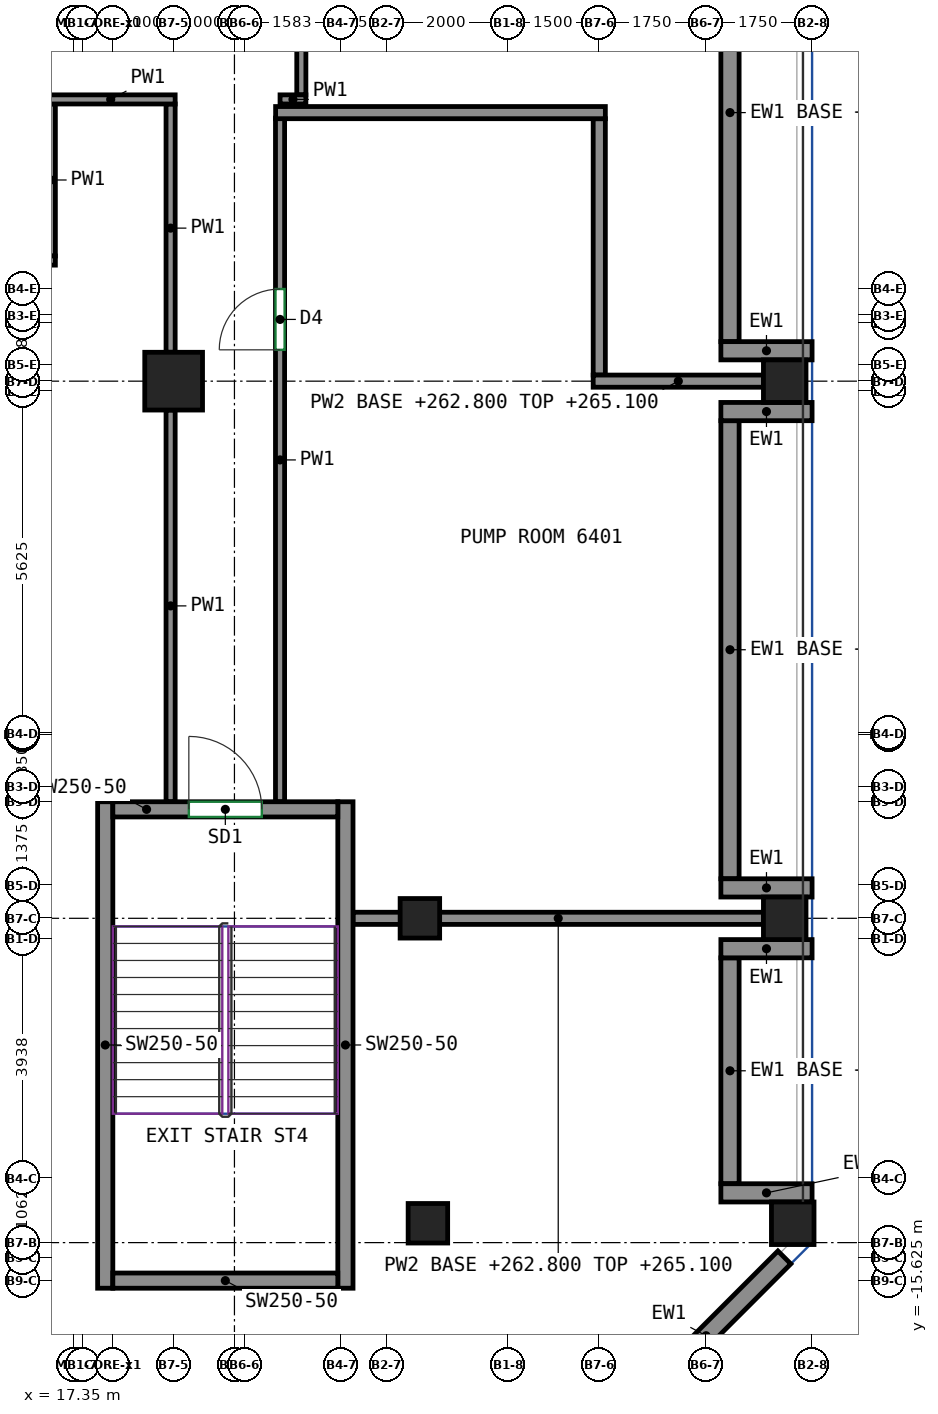
"""IFC4 building model, lengths in metres.
Left out: names, types, materials, properties, quantities, classifications, styles, units other than length and angle.
Written with IfcOpenShell. Run it as: python <this file> out.ifc"""

import sys

from ifc_helpers import new_model, si_unit, direction, frame, frame_2d, origin, origin_2d, place, context, subcontext, project, spatial, rectangle, extrude, source, transform, mapped, element, fill, save


model = new_model("IFC4")
c1 = context("Model", 3, precision=1e-05, world=origin(), true_north=direction((0.0, 1.0)))
c2 = subcontext(c1, "Body", "Model", "MODEL_VIEW")
j1 = project(units=[si_unit("LENGTHUNIT", "METRE"), si_unit("PLANEANGLEUNIT", "RADIAN")], contexts=[c1])
p1 = place(None, origin())
s1 = spatial("IfcSite", under=j1, at=p1, CompositionType="ELEMENT")
p2 = place(p1, origin())
s2 = spatial("IfcBuilding", under=s1, at=p2, CompositionType="ELEMENT")
p3 = place(p2, frame((0.0, 0.0, 262.8)))
s3 = spatial("IfcBuildingStorey", under=s2, at=p3, CompositionType="ELEMENT", Elevation=262.8)
m1 = source(origin(), c2, "Body", "SweptSolid", [
    extrude(rectangle(XDim=0.95, YDim=0.95, at=origin_2d()), origin(), (0.0, 0.0, 1.0), 2.3),
])
p4 = place(p3, frame((19.0, -0.833, 0.0), z_axis=(0.0, 0.0, 1.0), x_axis=(1.0, 0.0, 0.0)))
e1 = element("IfcColumn", 1, at=p4, inside=s3, PredefinedType="COLUMN", context=c2, shape_type="MappedRepresentation", body=[
    mapped(m1, transform((0.0, 0.0, 0.0))),
])
m2 = source(origin(), c2, "Body", "SweptSolid", [
    extrude(rectangle(XDim=0.7, YDim=0.7, at=origin_2d()), origin(), (0.0, 0.0, 1.0), 2.3),
])
for number, where, z_axis, x_axis in (
    (2, (29.05, -9.667, 0.0), (0.0, 0.0, 1.0), (1.0, 0.0, 0.0)),
    (3, (29.05, -0.833, 0.0), (0.0, 0.0, 1.0), (1.0, 0.0, 0.0)),
    (4, (29.182, -14.682, 0.0), (0.0, 0.0, 1.0), (1.0, 0.0, 0.0)),
):
    element("IfcColumn", number, at=place(p3, frame(where, z_axis=z_axis, x_axis=x_axis)), inside=s3, PredefinedType="COLUMN", context=c2, shape_type="MappedRepresentation", body=[
        mapped(m2, transform((0.0, 0.0, 0.0))),
    ])
m3 = source(origin(), c2, "Body", "SweptSolid", [
    extrude(rectangle(XDim=0.65, YDim=0.65, at=origin_2d()), origin(), (0.0, 0.0, 1.0), 3.8),
])
for number, where, z_axis, x_axis in (
    (5, (23.182, -14.682, 0.0), (0.0, 0.0, 1.0), (1.0, 0.0, 0.0)),
    (6, (23.05, -9.667, 0.0), (0.0, 0.0, 1.0), (1.0, 0.0, 0.0)),
):
    element("IfcColumn", number, at=place(p3, frame(where, z_axis=z_axis, x_axis=x_axis)), inside=s3, PredefinedType="COLUMN", context=c2, shape_type="MappedRepresentation", body=[
        mapped(m3, transform((0.0, 0.0, 0.0))),
    ])
m4 = source(origin(), c2, "Body", "SweptSolid", [
    extrude(rectangle(XDim=8.0, YDim=0.25, at=frame_2d((4.0, 0.0))), origin(), (0.0, 0.0, 1.0), 3.8),
])
for number, where, z_axis, x_axis in (
    (7, (17.875, -15.75, 0.0), (0.0, 0.0, 1.0), (0.0, 1.0, 0.0)),
    (8, (21.825, -15.75, 0.0), (0.0, 0.0, 1.0), (0.0, 1.0, 0.0)),
):
    element("IfcWall", number, at=place(p3, frame(where, z_axis=z_axis, x_axis=x_axis)), inside=s3, PredefinedType="SHEAR", context=c2, shape_type="MappedRepresentation", body=[
        mapped(m4, transform((0.0, 0.0, 0.0))),
    ])
m5 = source(origin(), c2, "Body", "SweptSolid", [
    extrude(rectangle(XDim=3.7, YDim=0.25, at=frame_2d((1.85, 0.0))), origin(), (0.0, 0.0, 1.0), 3.8),
])
p5 = place(p3, frame((18.0, -15.625, 0.0), z_axis=(0.0, 0.0, 1.0), x_axis=(1.0, 0.0, 0.0)))
e9 = element("IfcWall", 9, at=p5, inside=s3, PredefinedType="SHEAR", context=c2, shape_type="MappedRepresentation", body=[
    mapped(m5, transform((0.0, 0.0, 0.0))),
])
p6 = place(p3, frame((18.0, -7.875, 0.0), z_axis=(0.0, 0.0, 1.0), x_axis=(1.0, 0.0, 0.0)))
e10 = element("IfcWall", 10, at=p6, inside=s3, PredefinedType="SHEAR", context=c2, shape_type="MappedRepresentation", body=[
    mapped(m5, transform((0.0, 0.0, 0.0))),
])
p7 = place(p6, frame((1.25, 0.0, 0.0)))
e11 = element("IfcOpeningElement", 11, at=p7, cuts=e10, PredefinedType="OPENING", context=c2, shape_type="SweptSolid", body=[
    extrude(rectangle(XDim=1.2, YDim=2.1, at=frame_2d((0.6, 1.05))), frame((0.0, 0.135, 0.0), z_axis=(0.0, -1.0, 0.0), x_axis=(1.0, 0.0, 0.0)), (0.0, 0.0, 1.0), 0.27),
])
m6 = source(origin(), c2, "Body", "SweptSolid", [
    extrude(rectangle(XDim=3.642, YDim=0.3, at=frame_2d((1.821, 0.0))), origin(), (0.0, 0.0, 1.0), 2.3),
])
p8 = place(p3, frame((26.469, -17.819, 0.0), z_axis=(0.0, 0.0, 1.0), x_axis=(0.707106781187, 0.707106781187, 0.0)))
e12 = element("IfcWall", 12, at=p8, inside=s3, PredefinedType="SOLIDWALL", context=c2, shape_type="MappedRepresentation", body=[
    mapped(m6, transform((0.0, 0.0, 0.0))),
])
m7 = source(origin(), c2, "Body", "SweptSolid", [
    extrude(rectangle(XDim=3.715, YDim=0.3, at=frame_2d((1.857, 0.0))), origin(), (0.0, 0.0, 1.0), 1.1),
])
p9 = place(p3, frame((28.15, -14.032, 0.0), z_axis=(0.0, 0.0, 1.0), x_axis=(0.0, 1.0, 0.0)))
e13 = element("IfcWall", 13, at=p9, inside=s3, PredefinedType="SOLIDWALL", context=c2, shape_type="MappedRepresentation", body=[
    mapped(m7, transform((0.0, 0.0, 0.0))),
])
m8 = source(origin(), c2, "Body", "SweptSolid", [
    extrude(rectangle(XDim=1.5, YDim=0.3, at=frame_2d((0.75, 0.0))), origin(), (0.0, 0.0, 1.0), 3.8),
])
p10 = place(p3, frame((29.5, -14.182, 0.0), z_axis=(0.0, 0.0, 1.0), x_axis=(-1.0, 0.0, 0.0)))
e14 = element("IfcWall", 14, at=p10, inside=s3, PredefinedType="SOLIDWALL", context=c2, shape_type="MappedRepresentation", body=[
    mapped(m8, transform((0.0, 0.0, 0.0))),
])
m9 = source(origin(), c2, "Body", "SweptSolid", [
    extrude(rectangle(XDim=1.5, YDim=0.3, at=frame_2d((0.75, 0.0))), origin(), (0.0, 0.0, 1.0), 2.3),
])
p11 = place(p3, frame((29.5, -10.167, 0.0), z_axis=(0.0, 0.0, 1.0), x_axis=(-1.0, 0.0, 0.0)))
e15 = element("IfcWall", 15, at=p11, inside=s3, PredefinedType="SOLIDWALL", context=c2, shape_type="MappedRepresentation", body=[
    mapped(m9, transform((0.0, 0.0, 0.0))),
])
m10 = source(origin(), c2, "Body", "SweptSolid", [
    extrude(rectangle(XDim=7.533, YDim=0.3, at=frame_2d((3.767, 0.0))), origin(), (0.0, 0.0, 1.0), 1.1),
])
p12 = place(p3, frame((28.15, -9.017, 0.0), z_axis=(0.0, 0.0, 1.0), x_axis=(0.0, 1.0, 0.0)))
e16 = element("IfcWall", 16, at=p12, inside=s3, PredefinedType="SOLIDWALL", context=c2, shape_type="MappedRepresentation", body=[
    mapped(m10, transform((0.0, 0.0, 0.0))),
])
for number, where, z_axis, x_axis in (
    (17, (29.5, -9.167, 0.0), (0.0, 0.0, 1.0), (-1.0, 0.0, 0.0)),
    (18, (29.5, -1.333, 0.0), (0.0, 0.0, 1.0), (-1.0, 0.0, 0.0)),
):
    element("IfcWall", number, at=place(p3, frame(where, z_axis=z_axis, x_axis=x_axis)), inside=s3, PredefinedType="SOLIDWALL", context=c2, shape_type="MappedRepresentation", body=[
        mapped(m9, transform((0.0, 0.0, 0.0))),
    ])
m11 = source(origin(), c2, "Body", "SweptSolid", [
    extrude(rectangle(XDim=7.533, YDim=0.3, at=frame_2d((3.767, 0.0))), origin(), (0.0, 0.0, 1.0), 1.1),
])
p13 = place(p3, frame((28.15, -0.183, 0.0), z_axis=(0.0, 0.0, 1.0), x_axis=(0.0, 1.0, 0.0)))
e19 = element("IfcWall", 19, at=p13, inside=s3, PredefinedType="SOLIDWALL", context=c2, shape_type="MappedRepresentation", body=[
    mapped(m11, transform((0.0, 0.0, 0.0))),
])
p14 = place(p3, frame((29.5, -0.333, 0.0), z_axis=(0.0, 0.0, 1.0), x_axis=(-1.0, 0.0, 0.0)))
e20 = element("IfcWall", 20, at=p14, inside=s3, PredefinedType="SOLIDWALL", context=c2, shape_type="MappedRepresentation", body=[
    mapped(m9, transform((0.0, 0.0, 0.0))),
])
p15 = place(p3, frame((16.98, 1.225, 0.0), z_axis=(0.0, 0.0, 1.0), x_axis=(0.0, 1.0, 0.0)))
e21 = element("IfcWall", 21, at=p15, inside=s3, PredefinedType="PARTITIONING", context=c2, shape_type="SweptSolid", body=[
    extrude(rectangle(XDim=2.5, YDim=0.15, at=frame_2d((1.25, 0.0))), origin(), (0.0, 0.0, 1.0), 3.8),
])
p16 = place(p3, frame((8.405, 1.15, 0.0), z_axis=(0.0, 0.0, 1.0), x_axis=(1.0, 0.0, 0.0)))
e22 = element("IfcWall", 22, at=p16, inside=s3, PredefinedType="PARTITIONING", context=c2, shape_type="SweptSolid", body=[
    extrude(rectangle(XDim=8.65, YDim=0.15, at=frame_2d((4.325, 0.0))), origin(), (0.0, 0.0, 1.0), 3.8),
])
p17 = place(p16, frame((4.127, 0.0, 0.0)))
e23 = element("IfcOpeningElement", 23, at=p17, cuts=e22, PredefinedType="OPENING", context=c2, shape_type="SweptSolid", body=[
    extrude(rectangle(XDim=1.0, YDim=2.1, at=frame_2d((0.5, 1.05))), frame((0.0, 0.085, 0.0), z_axis=(0.0, -1.0, 0.0), x_axis=(1.0, 0.0, 0.0)), (0.0, 0.0, 1.0), 0.17),
])
p18 = place(p3, frame((18.95, -7.75, 0.0), z_axis=(0.0, 0.0, 1.0), x_axis=(0.0, 1.0, 0.0)))
e24 = element("IfcWall", 24, at=p18, inside=s3, PredefinedType="PARTITIONING", context=c2, shape_type="SweptSolid", body=[
    extrude(rectangle(XDim=6.442, YDim=0.15, at=frame_2d((3.221, 0.0))), origin(), (0.0, 0.0, 1.0), 3.8),
])
p19 = place(p3, frame((18.95, -0.358, 0.0), z_axis=(0.0, 0.0, 1.0), x_axis=(0.0, 1.0, 0.0)))
e25 = element("IfcWall", 25, at=p19, inside=s3, PredefinedType="PARTITIONING", context=c2, shape_type="SweptSolid", body=[
    extrude(rectangle(XDim=4.083, YDim=0.15, at=frame_2d((2.042, 0.0))), origin(), (0.0, 0.0, 1.0), 3.8),
])
p20 = place(p3, frame((16.905, 3.8, 0.0), z_axis=(0.0, 0.0, 1.0), x_axis=(1.0, 0.0, 0.0)))
e26 = element("IfcWall", 26, at=p20, inside=s3, PredefinedType="PARTITIONING", context=c2, shape_type="SweptSolid", body=[
    extrude(rectangle(XDim=2.12, YDim=0.15, at=frame_2d((1.06, 0.0))), origin(), (0.0, 0.0, 1.0), 3.8),
])
p21 = place(p3, frame((20.75, -7.75, 0.0), z_axis=(0.0, 0.0, 1.0), x_axis=(0.0, 1.0, 0.0)))
e27 = element("IfcWall", 27, at=p21, inside=s3, PredefinedType="PARTITIONING", context=c2, shape_type="SweptSolid", body=[
    extrude(rectangle(XDim=11.243, YDim=0.15, at=frame_2d((5.622, 0.0))), origin(), (0.0, 0.0, 1.0), 3.8),
])
p22 = place(p21, frame((7.432, 0.0, 0.0)))
e28 = element("IfcOpeningElement", 28, at=p22, cuts=e27, PredefinedType="OPENING", context=c2, shape_type="SweptSolid", body=[
    extrude(rectangle(XDim=1.0, YDim=2.1, at=frame_2d((0.5, 1.05))), frame((0.0, 0.085, 0.0), z_axis=(0.0, -1.0, 0.0), x_axis=(1.0, 0.0, 0.0)), (0.0, 0.0, 1.0), 0.17),
])
p23 = place(p3, frame((21.1, 3.875, 0.0), z_axis=(0.0, 0.0, 1.0), x_axis=(0.0, 1.0, 0.0)))
e29 = element("IfcWall", 29, at=p23, inside=s3, PredefinedType="PARTITIONING", context=c2, shape_type="SweptSolid", body=[
    extrude(rectangle(XDim=18.035, YDim=0.15, at=frame_2d((9.018, 0.0))), origin(), (0.0, 0.0, 1.0), 3.8),
])
p24 = place(p23, frame((7.014, 0.0, 0.0)))
e30 = element("IfcOpeningElement", 30, at=p24, cuts=e29, PredefinedType="OPENING", context=c2, shape_type="SweptSolid", body=[
    extrude(rectangle(XDim=1.0, YDim=2.1, at=frame_2d((0.5, 1.05))), frame((0.0, 0.085, 0.0), z_axis=(0.0, -1.0, 0.0), x_axis=(1.0, 0.0, 0.0)), (0.0, 0.0, 1.0), 0.17),
])
p25 = place(p3, frame((20.75, 3.8, 0.0), z_axis=(0.0, 0.0, 1.0), x_axis=(1.0, 0.0, 0.0)))
e31 = element("IfcWall", 31, at=p25, inside=s3, PredefinedType="PARTITIONING", context=c2, shape_type="SweptSolid", body=[
    extrude(rectangle(XDim=0.425, YDim=0.15, at=frame_2d((0.212, 0.0))), origin(), (0.0, 0.0, 1.0), 3.8),
])
p26 = place(p3, frame((21.95, -9.667, 0.0), z_axis=(0.0, 0.0, 1.0), x_axis=(1.0, 0.0, 0.0)))
e32 = element("IfcWall", 32, at=p26, inside=s3, PredefinedType="PARTITIONING", context=c2, shape_type="SweptSolid", body=[
    extrude(rectangle(XDim=6.75, YDim=0.2, at=frame_2d((3.375, 0.0))), origin(), (0.0, 0.0, 1.0), 2.3),
])
p27 = place(p3, frame((26.0, -0.733, 0.0), z_axis=(0.0, 0.0, 1.0), x_axis=(0.0, 1.0, 0.0)))
e33 = element("IfcWall", 33, at=p27, inside=s3, PredefinedType="PARTITIONING", context=c2, shape_type="SweptSolid", body=[
    extrude(rectangle(XDim=4.216, YDim=0.2, at=frame_2d((2.108, 0.0))), origin(), (0.0, 0.0, 1.0), 3.8),
])
p28 = place(p3, frame((28.7, -0.833, 0.0), z_axis=(0.0, 0.0, 1.0), x_axis=(-1.0, 0.0, 0.0)))
e34 = element("IfcWall", 34, at=p28, inside=s3, PredefinedType="PARTITIONING", context=c2, shape_type="SweptSolid", body=[
    extrude(rectangle(XDim=2.8, YDim=0.2, at=frame_2d((1.4, 0.0))), origin(), (0.0, 0.0, 1.0), 2.3),
])
p29 = place(p3, frame((26.1, 3.583, 0.0), z_axis=(0.0, 0.0, 1.0), x_axis=(-1.0, 0.0, 0.0)))
e35 = element("IfcWall", 35, at=p29, inside=s3, PredefinedType="PARTITIONING", context=c2, shape_type="SweptSolid", body=[
    extrude(rectangle(XDim=5.423, YDim=0.2, at=frame_2d((2.711, 0.0))), origin(), (0.0, 0.0, 1.0), 3.8),
])
p30 = place(p7, origin())
e36 = element("IfcDoor", 36, at=p30, inside=s3, OperationType="DOUBLE_DOOR_SINGLE_SWING", PredefinedType="DOOR", context=c2, shape_type="SweptSolid", body=[
    extrude(rectangle(XDim=1.2, YDim=2.1, at=frame_2d((0.6, 1.05))), frame((0.0, 0.025, 0.0), z_axis=(0.0, -1.0, 0.0), x_axis=(1.0, 0.0, 0.0)), (0.0, 0.0, 1.0), 0.05),
])
fill(e11, e36)
p31 = place(p22, origin())
e37 = element("IfcDoor", 37, at=p31, inside=s3, OperationType="SINGLE_SWING_LEFT", PredefinedType="DOOR", context=c2, shape_type="SweptSolid", body=[
    extrude(rectangle(XDim=1.0, YDim=2.1, at=frame_2d((0.5, 1.05))), frame((0.0, 0.025, 0.0), z_axis=(0.0, -1.0, 0.0), x_axis=(1.0, 0.0, 0.0)), (0.0, 0.0, 1.0), 0.05),
])
fill(e28, e37)
save(model, sys.argv[1])
